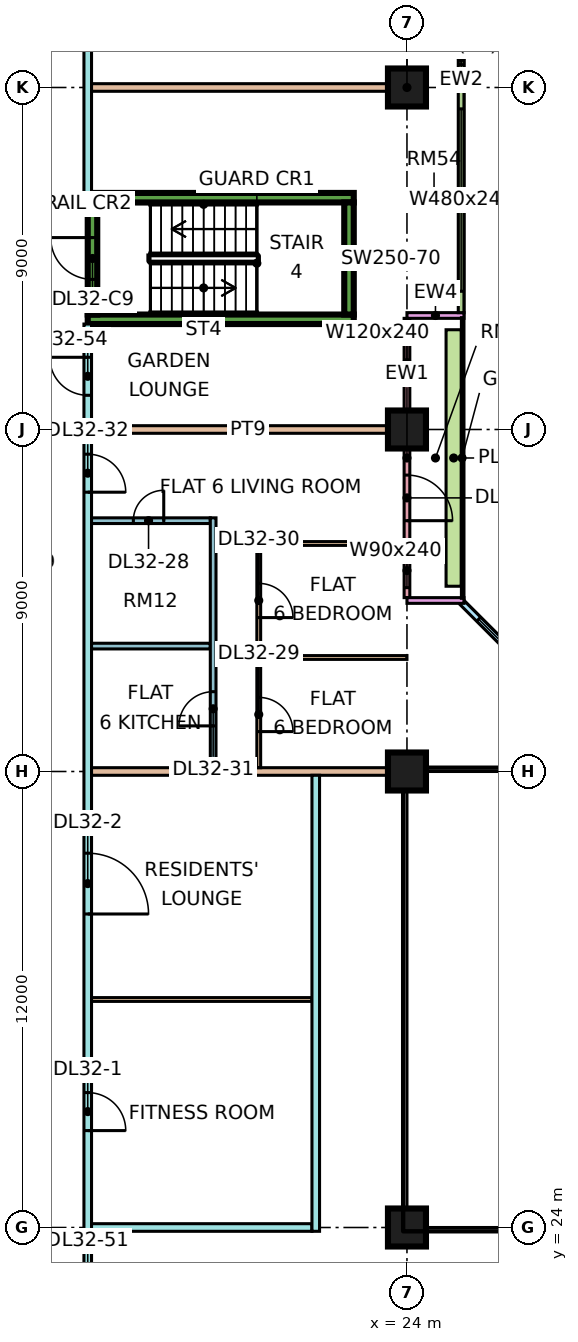
"""IFC4 building model, lengths in metres.
Left out: names, types, materials, properties, quantities, classifications, styles, units other than length and angle.
Written with IfcOpenShell. Run it as: python <this file> out.ifc"""

import sys

from ifc_helpers import new_model, si_unit, direction, frame, frame_2d, origin, origin_2d, place, context, subcontext, project, spatial, rectangle, extrude, element, fill, save


model = new_model("IFC4")
c1 = context("Model", 3, precision=1e-05, world=origin(), true_north=direction((0.0, 1.0)))
c2 = subcontext(c1, "Body", "Model", "MODEL_VIEW")
j1 = project(units=[si_unit("LENGTHUNIT", "METRE"), si_unit("PLANEANGLEUNIT", "RADIAN")], contexts=[c1])
p1 = place(None, origin())
s1 = spatial("IfcSite", under=j1, at=p1, CompositionType="ELEMENT")
p2 = place(p1, origin())
s2 = spatial("IfcBuilding", under=s1, at=p2, CompositionType="ELEMENT")
p3 = place(p2, frame((0.0, 0.0, 136.9)))
s3 = spatial("IfcBuildingStorey", under=s2, at=p3, CompositionType="ELEMENT", Elevation=136.9)
for number, where, z_axis, x_axis in (
    (1, (24.0, 24.0, 0.0), (0.0, 0.0, 1.0), (1.0, 0.0, 0.0)),
    (2, (24.0, 36.0, 0.0), (0.0, 0.0, 1.0), (1.0, 0.0, 0.0)),
    (3, (24.0, 45.0, 0.0), (0.0, 0.0, 1.0), (1.0, 0.0, 0.0)),
    (4, (24.0, 54.0, 0.0), (0.0, 0.0, 1.0), (1.0, 0.0, 0.0)),
):
    element("IfcColumn", number, at=place(p3, frame(where, z_axis=z_axis, x_axis=x_axis)), inside=s3, PredefinedType="COLUMN", context=c2, shape_type="SweptSolid", body=[
        extrude(rectangle(XDim=1.0, YDim=1.0, at=origin_2d()), origin(), (0.0, 0.0, 1.0), 3.75),
    ])
for number, where, z_axis, x_axis in (
    (5, (15.6, 47.9, 0.0), (0.0, 0.0, 1.0), (1.0, 0.0, 0.0)),
    (6, (15.6, 51.1, 0.0), (0.0, 0.0, 1.0), (1.0, 0.0, 0.0)),
):
    element("IfcWall", number, at=place(p3, frame(where, z_axis=z_axis, x_axis=x_axis)), inside=s3, PredefinedType="SHEAR", context=c2, shape_type="SweptSolid", body=[
        extrude(rectangle(XDim=7.0, YDim=0.25, at=frame_2d((3.5, 0.0))), origin(), (0.0, 0.0, 1.0), 3.75),
    ])
p4 = place(p3, frame((15.725, 48.025, 0.0), z_axis=(0.0, 0.0, 1.0), x_axis=(0.0, 1.0, 0.0)))
e7 = element("IfcWall", 7, at=p4, inside=s3, PredefinedType="SHEAR", context=c2, shape_type="SweptSolid", body=[
    extrude(rectangle(XDim=2.95, YDim=0.25, at=frame_2d((1.475, 0.0))), origin(), (0.0, 0.0, 1.0), 3.75),
])
p5 = place(p4, frame((0.925, 0.0, 0.0)))
e8 = element("IfcOpeningElement", 8, at=p5, cuts=e7, PredefinedType="OPENING", context=c2, shape_type="SweptSolid", body=[
    extrude(rectangle(XDim=1.1, YDim=2.2, at=frame_2d((0.55, 1.1))), frame((0.0, 0.135, 0.0), z_axis=(0.0, -1.0, 0.0), x_axis=(1.0, 0.0, 0.0)), (0.0, 0.0, 1.0), 0.27),
])
p6 = place(p3, frame((22.475, 48.025, 0.0), z_axis=(0.0, 0.0, 1.0), x_axis=(0.0, 1.0, 0.0)))
e9 = element("IfcWall", 9, at=p6, inside=s3, PredefinedType="SHEAR", context=c2, shape_type="SweptSolid", body=[
    extrude(rectangle(XDim=2.95, YDim=0.25, at=frame_2d((1.475, 0.0))), origin(), (0.0, 0.0, 1.0), 3.75),
])
p7 = place(p3, frame((28.447, 37.447, 0.0), z_axis=(0.0, 0.0, 1.0), x_axis=(-0.707106781187, 0.707106781187, 0.0)))
e10 = element("IfcWall", 10, at=p7, inside=s3, PredefinedType="SOLIDWALL", context=c2, shape_type="SweptSolid", body=[
    extrude(rectangle(XDim=4.243, YDim=0.15, at=frame_2d((2.121, 0.0))), origin(), (0.0, 0.0, 1.0), 3.3),
])
p8 = place(p7, frame((0.621, 0.0, 0.45)))
e11 = element("IfcOpeningElement", 11, at=p8, cuts=e10, PredefinedType="OPENING", context=c2, shape_type="SweptSolid", body=[
    extrude(rectangle(XDim=3.0, YDim=2.4, at=frame_2d((1.5, 1.2))), frame((0.0, 0.085, 0.0), z_axis=(0.0, -1.0, 0.0), x_axis=(1.0, 0.0, 0.0)), (0.0, 0.0, 1.0), 0.17),
])
p9 = place(p3, frame((24.0, 40.575, 0.0), z_axis=(0.0, 0.0, 1.0), x_axis=(0.0, 1.0, 0.0)))
e12 = element("IfcWall", 12, at=p9, inside=s3, PredefinedType="SOLIDWALL", context=c2, shape_type="SweptSolid", body=[
    extrude(rectangle(XDim=7.35, YDim=0.15, at=frame_2d((3.675, 0.0))), origin(), (0.0, 0.0, 1.0), 3.3),
])
p10 = place(p9, frame((0.262, 0.0, 0.45)))
e13 = element("IfcOpeningElement", 13, at=p10, cuts=e12, PredefinedType="OPENING", context=c2, shape_type="SweptSolid", body=[
    extrude(rectangle(XDim=0.9, YDim=2.4, at=frame_2d((0.45, 1.2))), frame((0.0, 0.085, 0.0), z_axis=(0.0, -1.0, 0.0), x_axis=(1.0, 0.0, 0.0)), (0.0, 0.0, 1.0), 0.17),
])
p11 = place(p9, frame((2.025, 0.0, 0.0)))
e14 = element("IfcOpeningElement", 14, at=p11, cuts=e12, PredefinedType="OPENING", context=c2, shape_type="SweptSolid", body=[
    extrude(rectangle(XDim=1.2, YDim=2.4, at=frame_2d((0.6, 1.2))), frame((0.0, 0.085, 0.0), z_axis=(0.0, -1.0, 0.0), x_axis=(1.0, 0.0, 0.0)), (0.0, 0.0, 1.0), 0.17),
])
p12 = place(p9, frame((5.587, 0.0, 0.45)))
e15 = element("IfcOpeningElement", 15, at=p12, cuts=e12, PredefinedType="OPENING", context=c2, shape_type="SweptSolid", body=[
    extrude(rectangle(XDim=1.2, YDim=2.4, at=frame_2d((0.6, 1.2))), frame((0.0, 0.085, 0.0), z_axis=(0.0, -1.0, 0.0), x_axis=(1.0, 0.0, 0.0)), (0.0, 0.0, 1.0), 0.17),
])
for number, where, z_axis, x_axis in (
    (16, (25.5, 40.5, 0.0), (0.0, 0.0, 1.0), (-1.0, 0.0, 0.0)),
    (17, (25.5, 48.0, 0.0), (0.0, 0.0, 1.0), (-1.0, 0.0, 0.0)),
):
    element("IfcWall", number, at=place(p3, frame(where, z_axis=z_axis, x_axis=x_axis)), inside=s3, PredefinedType="SOLIDWALL", context=c2, shape_type="SweptSolid", body=[
        extrude(rectangle(XDim=1.5, YDim=0.15, at=frame_2d((0.75, 0.0))), origin(), (0.0, 0.0, 1.0), 3.3),
    ])
p13 = place(p3, frame((25.425, 48.075, 0.0), z_axis=(0.0, 0.0, 1.0), x_axis=(0.0, 1.0, 0.0)))
e18 = element("IfcWall", 18, at=p13, inside=s3, PredefinedType="SOLIDWALL", context=c2, shape_type="SweptSolid", body=[
    extrude(rectangle(XDim=13.425, YDim=0.15, at=frame_2d((6.712, 0.0))), origin(), (0.0, 0.0, 1.0), 3.3),
])
p14 = place(p13, frame((0.562, 0.0, 0.45)))
e19 = element("IfcOpeningElement", 19, at=p14, cuts=e18, PredefinedType="OPENING", context=c2, shape_type="SweptSolid", body=[
    extrude(rectangle(XDim=4.8, YDim=2.4, at=frame_2d((2.4, 1.2))), frame((0.0, 0.085, 0.0), z_axis=(0.0, -1.0, 0.0), x_axis=(1.0, 0.0, 0.0)), (0.0, 0.0, 1.0), 0.17),
])
p15 = place(p13, frame((6.525, 0.0, 0.45)))
e20 = element("IfcOpeningElement", 20, at=p15, cuts=e18, PredefinedType="OPENING", context=c2, shape_type="SweptSolid", body=[
    extrude(rectangle(XDim=1.8, YDim=2.4, at=frame_2d((0.9, 1.2))), frame((0.0, 0.085, 0.0), z_axis=(0.0, -1.0, 0.0), x_axis=(1.0, 0.0, 0.0)), (0.0, 0.0, 1.0), 0.17),
])
p16 = place(p13, frame((9.525, 0.0, 0.45)))
e21 = element("IfcOpeningElement", 21, at=p16, cuts=e18, PredefinedType="OPENING", context=c2, shape_type="SweptSolid", body=[
    extrude(rectangle(XDim=1.8, YDim=2.4, at=frame_2d((0.9, 1.2))), frame((0.0, 0.085, 0.0), z_axis=(0.0, -1.0, 0.0), x_axis=(1.0, 0.0, 0.0)), (0.0, 0.0, 1.0), 0.17),
])
p17 = place(p13, frame((12.225, 0.0, 0.45)))
e22 = element("IfcOpeningElement", 22, at=p17, cuts=e18, PredefinedType="OPENING", context=c2, shape_type="SweptSolid", body=[
    extrude(rectangle(XDim=0.9, YDim=2.4, at=frame_2d((0.45, 1.2))), frame((0.0, 0.085, 0.0), z_axis=(0.0, -1.0, 0.0), x_axis=(1.0, 0.0, 0.0)), (0.0, 0.0, 1.0), 0.17),
])
p18 = place(p3, frame((25.229, 40.875, 0.0), z_axis=(0.0, 0.0, 1.0), x_axis=(0.0, 1.0, 0.0)))
e23 = element("IfcWall", 23, at=p18, inside=s3, PredefinedType="SOLIDWALL", context=c2, shape_type="SweptSolid", body=[
    extrude(rectangle(XDim=6.75, YDim=0.4, at=frame_2d((3.375, 0.0))), origin(), (0.0, 0.0, 1.0), 0.7),
])
p19 = place(p3, frame((15.6, 20.0, 0.0), z_axis=(0.0, 0.0, 1.0), x_axis=(0.0, 1.0, 0.0)))
e24 = element("IfcWall", 24, at=p19, inside=s3, PredefinedType="PARTITIONING", context=c2, shape_type="SweptSolid", body=[
    extrude(rectangle(XDim=27.775, YDim=0.2, at=frame_2d((13.887, 0.0))), origin(), (0.0, 0.0, 1.0), 3.3),
])
p20 = place(p19, frame((6.55, 0.0, 0.0)))
e25 = element("IfcOpeningElement", 25, at=p20, cuts=e24, PredefinedType="OPENING", context=c2, shape_type="SweptSolid", body=[
    extrude(rectangle(XDim=1.0, YDim=2.1, at=frame_2d((0.5, 1.05))), frame((0.0, 0.11, 0.0), z_axis=(0.0, -1.0, 0.0), x_axis=(1.0, 0.0, 0.0)), (0.0, 0.0, 1.0), 0.22),
])
p21 = place(p19, frame((12.25, 0.0, 0.0)))
e26 = element("IfcOpeningElement", 26, at=p21, cuts=e24, PredefinedType="OPENING", context=c2, shape_type="SweptSolid", body=[
    extrude(rectangle(XDim=1.6, YDim=2.1, at=frame_2d((0.8, 1.05))), frame((0.0, 0.11, 0.0), z_axis=(0.0, -1.0, 0.0), x_axis=(1.0, 0.0, 0.0)), (0.0, 0.0, 1.0), 0.22),
])
p22 = place(p19, frame((23.35, 0.0, 0.0)))
e27 = element("IfcOpeningElement", 27, at=p22, cuts=e24, PredefinedType="OPENING", context=c2, shape_type="SweptSolid", body=[
    extrude(rectangle(XDim=1.0, YDim=2.1, at=frame_2d((0.5, 1.05))), frame((0.0, 0.11, 0.0), z_axis=(0.0, -1.0, 0.0), x_axis=(1.0, 0.0, 0.0)), (0.0, 0.0, 1.0), 0.22),
])
p23 = place(p19, frame((1.15, 0.0, 0.0)))
e28 = element("IfcOpeningElement", 28, at=p23, cuts=e24, PredefinedType="OPENING", context=c2, shape_type="SweptSolid", body=[
    extrude(rectangle(XDim=1.8, YDim=2.1, at=frame_2d((0.9, 1.05))), frame((0.0, 0.11, 0.0), z_axis=(0.0, -1.0, 0.0), x_axis=(1.0, 0.0, 0.0)), (0.0, 0.0, 1.0), 0.22),
])
p24 = place(p19, frame((25.9, 0.0, 0.0)))
e29 = element("IfcOpeningElement", 29, at=p24, cuts=e24, PredefinedType="OPENING", context=c2, shape_type="SweptSolid", body=[
    extrude(rectangle(XDim=1.0, YDim=2.1, at=frame_2d((0.5, 1.05))), frame((0.0, 0.11, 0.0), z_axis=(0.0, -1.0, 0.0), x_axis=(1.0, 0.0, 0.0)), (0.0, 0.0, 1.0), 0.22),
])
p25 = place(p3, frame((15.6, 51.225, 0.0), z_axis=(0.0, 0.0, 1.0), x_axis=(0.0, 1.0, 0.0)))
e30 = element("IfcWall", 30, at=p25, inside=s3, PredefinedType="PARTITIONING", context=c2, shape_type="SweptSolid", body=[
    extrude(rectangle(XDim=11.701, YDim=0.2, at=frame_2d((5.851, 0.0))), origin(), (0.0, 0.0, 1.0), 3.3),
])
p26 = place(p25, frame((3.825, 0.0, 0.0)))
e31 = element("IfcOpeningElement", 31, at=p26, cuts=e30, PredefinedType="OPENING", context=c2, shape_type="SweptSolid", body=[
    extrude(rectangle(XDim=1.0, YDim=2.1, at=frame_2d((0.5, 1.05))), frame((0.0, 0.11, 0.0), z_axis=(0.0, -1.0, 0.0), x_axis=(1.0, 0.0, 0.0)), (0.0, 0.0, 1.0), 0.22),
])
p27 = place(p3, frame((15.7, 24.0, 0.0), z_axis=(0.0, 0.0, 1.0), x_axis=(1.0, 0.0, 0.0)))
e32 = element("IfcWall", 32, at=p27, inside=s3, PredefinedType="PARTITIONING", context=c2, shape_type="SweptSolid", body=[
    extrude(rectangle(XDim=5.8, YDim=0.2, at=frame_2d((2.9, 0.0))), origin(), (0.0, 0.0, 1.0), 3.3),
])
p28 = place(p3, frame((15.7, 30.0, 0.0), z_axis=(0.0, 0.0, 1.0), x_axis=(1.0, 0.0, 0.0)))
e33 = element("IfcWall", 33, at=p28, inside=s3, PredefinedType="PARTITIONING", context=c2, shape_type="SweptSolid", body=[
    extrude(rectangle(XDim=5.8, YDim=0.1, at=frame_2d((2.9, 0.0))), origin(), (0.0, 0.0, 1.0), 3.3),
])
p29 = place(p3, frame((15.7, 36.0, 0.0), z_axis=(0.0, 0.0, 1.0), x_axis=(1.0, 0.0, 0.0)))
e34 = element("IfcWall", 34, at=p29, inside=s3, PredefinedType="PARTITIONING", context=c2, shape_type="SweptSolid", body=[
    extrude(rectangle(XDim=8.3, YDim=0.2, at=frame_2d((4.15, 0.0))), origin(), (0.0, 0.0, 1.0), 3.3),
])
p30 = place(p3, frame((15.7, 39.3, 0.0), z_axis=(0.0, 0.0, 1.0), x_axis=(1.0, 0.0, 0.0)))
e35 = element("IfcWall", 35, at=p30, inside=s3, PredefinedType="PARTITIONING", context=c2, shape_type="SweptSolid", body=[
    extrude(rectangle(XDim=3.125, YDim=0.15, at=frame_2d((1.562, 0.0))), origin(), (0.0, 0.0, 1.0), 3.3),
])
p31 = place(p3, frame((15.7, 42.6, 0.0), z_axis=(0.0, 0.0, 1.0), x_axis=(1.0, 0.0, 0.0)))
e36 = element("IfcWall", 36, at=p31, inside=s3, PredefinedType="PARTITIONING", context=c2, shape_type="SweptSolid", body=[
    extrude(rectangle(XDim=3.125, YDim=0.15, at=frame_2d((1.562, 0.0))), origin(), (0.0, 0.0, 1.0), 3.3),
])
p32 = place(p31, frame((1.1, 0.0, 0.0)))
e37 = element("IfcOpeningElement", 37, at=p32, cuts=e36, PredefinedType="OPENING", context=c2, shape_type="SweptSolid", body=[
    extrude(rectangle(XDim=0.8, YDim=2.1, at=frame_2d((0.4, 1.05))), frame((0.0, 0.085, 0.0), z_axis=(0.0, -1.0, 0.0), x_axis=(1.0, 0.0, 0.0)), (0.0, 0.0, 1.0), 0.17),
])
p33 = place(p3, frame((15.7, 45.0, 0.0), z_axis=(0.0, 0.0, 1.0), x_axis=(1.0, 0.0, 0.0)))
e38 = element("IfcWall", 38, at=p33, inside=s3, PredefinedType="PARTITIONING", context=c2, shape_type="SweptSolid", body=[
    extrude(rectangle(XDim=8.226, YDim=0.2, at=frame_2d((4.113, 0.0))), origin(), (0.0, 0.0, 1.0), 3.3),
])
p34 = place(p3, frame((15.7, 54.0, 0.0), z_axis=(0.0, 0.0, 1.0), x_axis=(1.0, 0.0, 0.0)))
e39 = element("IfcWall", 39, at=p34, inside=s3, PredefinedType="PARTITIONING", context=c2, shape_type="SweptSolid", body=[
    extrude(rectangle(XDim=8.3, YDim=0.2, at=frame_2d((4.15, 0.0))), origin(), (0.0, 0.0, 1.0), 3.3),
])
p35 = place(p3, frame((18.9, 36.1, 0.0), z_axis=(0.0, 0.0, 1.0), x_axis=(0.0, 1.0, 0.0)))
e40 = element("IfcWall", 40, at=p35, inside=s3, PredefinedType="PARTITIONING", context=c2, shape_type="SweptSolid", body=[
    extrude(rectangle(XDim=6.575, YDim=0.15, at=frame_2d((3.288, 0.0))), origin(), (0.0, 0.0, 1.0), 3.3),
])
p36 = place(p35, frame((1.1, 0.0, 0.0)))
e41 = element("IfcOpeningElement", 41, at=p36, cuts=e40, PredefinedType="OPENING", context=c2, shape_type="SweptSolid", body=[
    extrude(rectangle(XDim=0.9, YDim=2.1, at=frame_2d((0.45, 1.05))), frame((0.0, 0.085, 0.0), z_axis=(0.0, -1.0, 0.0), x_axis=(1.0, 0.0, 0.0)), (0.0, 0.0, 1.0), 0.17),
])
p37 = place(p3, frame((20.1, 36.1, 0.0), z_axis=(0.0, 0.0, 1.0), x_axis=(0.0, 1.0, 0.0)))
e42 = element("IfcWall", 42, at=p37, inside=s3, PredefinedType="PARTITIONING", context=c2, shape_type="SweptSolid", body=[
    extrude(rectangle(XDim=5.95, YDim=0.1, at=frame_2d((2.975, 0.0))), origin(), (0.0, 0.0, 1.0), 3.3),
])
p38 = place(p37, frame((0.95, 0.0, 0.0)))
e43 = element("IfcOpeningElement", 43, at=p38, cuts=e42, PredefinedType="OPENING", context=c2, shape_type="SweptSolid", body=[
    extrude(rectangle(XDim=0.9, YDim=2.1, at=frame_2d((0.45, 1.05))), frame((0.0, 0.06, 0.0), z_axis=(0.0, -1.0, 0.0), x_axis=(1.0, 0.0, 0.0)), (0.0, 0.0, 1.0), 0.12),
])
p39 = place(p37, frame((3.95, 0.0, 0.0)))
e44 = element("IfcOpeningElement", 44, at=p39, cuts=e42, PredefinedType="OPENING", context=c2, shape_type="SweptSolid", body=[
    extrude(rectangle(XDim=0.9, YDim=2.1, at=frame_2d((0.45, 1.05))), frame((0.0, 0.06, 0.0), z_axis=(0.0, -1.0, 0.0), x_axis=(1.0, 0.0, 0.0)), (0.0, 0.0, 1.0), 0.12),
])
p40 = place(p3, frame((20.15, 39.0, 0.0), z_axis=(0.0, 0.0, 1.0), x_axis=(1.0, 0.0, 0.0)))
e45 = element("IfcWall", 45, at=p40, inside=s3, PredefinedType="PARTITIONING", context=c2, shape_type="SweptSolid", body=[
    extrude(rectangle(XDim=3.85, YDim=0.1, at=frame_2d((1.925, 0.0))), origin(), (0.0, 0.0, 1.0), 3.3),
])
p41 = place(p3, frame((20.15, 42.0, 0.0), z_axis=(0.0, 0.0, 1.0), x_axis=(1.0, 0.0, 0.0)))
e46 = element("IfcWall", 46, at=p41, inside=s3, PredefinedType="PARTITIONING", context=c2, shape_type="SweptSolid", body=[
    extrude(rectangle(XDim=3.776, YDim=0.1, at=frame_2d((1.888, 0.0))), origin(), (0.0, 0.0, 1.0), 3.3),
])
p42 = place(p3, frame((21.6, 23.9, 0.0), z_axis=(0.0, 0.0, 1.0), x_axis=(0.0, 1.0, 0.0)))
e47 = element("IfcWall", 47, at=p42, inside=s3, PredefinedType="PARTITIONING", context=c2, shape_type="SweptSolid", body=[
    extrude(rectangle(XDim=12.0, YDim=0.2, at=frame_2d((6.0, 0.0))), origin(), (0.0, 0.0, 1.0), 3.3),
])
p43 = place(p8, origin())
e48 = element("IfcWindow", 48, at=p43, inside=s3, PartitioningType="SINGLE_PANEL", PredefinedType="WINDOW", context=c2, shape_type="SweptSolid", body=[
    extrude(rectangle(XDim=3.0, YDim=2.4, at=frame_2d((1.5, 1.2))), frame((0.0, 0.03, 0.0), z_axis=(0.0, -1.0, 0.0), x_axis=(1.0, 0.0, 0.0)), (0.0, 0.0, 1.0), 0.06),
])
fill(e11, e48)
p44 = place(p10, origin())
e49 = element("IfcWindow", 49, at=p44, inside=s3, PartitioningType="SINGLE_PANEL", PredefinedType="WINDOW", context=c2, shape_type="SweptSolid", body=[
    extrude(rectangle(XDim=0.9, YDim=2.4, at=frame_2d((0.45, 1.2))), frame((0.0, 0.03, 0.0), z_axis=(0.0, -1.0, 0.0), x_axis=(1.0, 0.0, 0.0)), (0.0, 0.0, 1.0), 0.06),
])
fill(e13, e49)
p45 = place(p11, frame((1.2, 0.0, 0.0), z_axis=(0.0, 0.0, 1.0), x_axis=(-1.0, 0.0, 0.0)))
e50 = element("IfcDoor", 50, at=p45, inside=s3, OperationType="DOUBLE_DOOR_SINGLE_SWING", PredefinedType="DOOR", context=c2, shape_type="SweptSolid", body=[
    extrude(rectangle(XDim=1.2, YDim=2.4, at=frame_2d((0.6, 1.2))), frame((0.0, 0.025, 0.0), z_axis=(0.0, -1.0, 0.0), x_axis=(1.0, 0.0, 0.0)), (0.0, 0.0, 1.0), 0.05),
])
fill(e14, e50)
p46 = place(p12, origin())
e51 = element("IfcWindow", 51, at=p46, inside=s3, PartitioningType="SINGLE_PANEL", PredefinedType="WINDOW", context=c2, shape_type="SweptSolid", body=[
    extrude(rectangle(XDim=1.2, YDim=2.4, at=frame_2d((0.6, 1.2))), frame((0.0, 0.03, 0.0), z_axis=(0.0, -1.0, 0.0), x_axis=(1.0, 0.0, 0.0)), (0.0, 0.0, 1.0), 0.06),
])
fill(e15, e51)
p47 = place(p14, origin())
e52 = element("IfcWindow", 52, at=p47, inside=s3, PartitioningType="SINGLE_PANEL", PredefinedType="WINDOW", context=c2, shape_type="SweptSolid", body=[
    extrude(rectangle(XDim=4.8, YDim=2.4, at=frame_2d((2.4, 1.2))), frame((0.0, 0.03, 0.0), z_axis=(0.0, -1.0, 0.0), x_axis=(1.0, 0.0, 0.0)), (0.0, 0.0, 1.0), 0.06),
])
fill(e19, e52)
p48 = place(p15, origin())
e53 = element("IfcWindow", 53, at=p48, inside=s3, PartitioningType="SINGLE_PANEL", PredefinedType="WINDOW", context=c2, shape_type="SweptSolid", body=[
    extrude(rectangle(XDim=1.8, YDim=2.4, at=frame_2d((0.9, 1.2))), frame((0.0, 0.03, 0.0), z_axis=(0.0, -1.0, 0.0), x_axis=(1.0, 0.0, 0.0)), (0.0, 0.0, 1.0), 0.06),
])
fill(e20, e53)
p49 = place(p5, frame((1.1, 0.0, 0.0), z_axis=(0.0, 0.0, 1.0), x_axis=(-1.0, 0.0, 0.0)))
e54 = element("IfcDoor", 54, at=p49, inside=s3, OperationType="SINGLE_SWING_RIGHT", PredefinedType="DOOR", context=c2, shape_type="SweptSolid", body=[
    extrude(rectangle(XDim=1.1, YDim=2.2, at=frame_2d((0.55, 1.1))), frame((0.0, 0.025, 0.0), z_axis=(0.0, -1.0, 0.0), x_axis=(1.0, 0.0, 0.0)), (0.0, 0.0, 1.0), 0.05),
])
fill(e8, e54)
p50 = place(p20, frame((1.0, 0.0, 0.0), z_axis=(0.0, 0.0, 1.0), x_axis=(-1.0, 0.0, 0.0)))
e55 = element("IfcDoor", 55, at=p50, inside=s3, OperationType="SINGLE_SWING_LEFT", PredefinedType="DOOR", context=c2, shape_type="SweptSolid", body=[
    extrude(rectangle(XDim=1.0, YDim=2.1, at=frame_2d((0.5, 1.05))), frame((0.0, 0.025, 0.0), z_axis=(0.0, -1.0, 0.0), x_axis=(1.0, 0.0, 0.0)), (0.0, 0.0, 1.0), 0.05),
])
fill(e25, e55)
p51 = place(p21, frame((1.6, 0.0, 0.0), z_axis=(0.0, 0.0, 1.0), x_axis=(-1.0, 0.0, 0.0)))
e56 = element("IfcDoor", 56, at=p51, inside=s3, OperationType="DOUBLE_DOOR_SINGLE_SWING", PredefinedType="DOOR", context=c2, shape_type="SweptSolid", body=[
    extrude(rectangle(XDim=1.6, YDim=2.1, at=frame_2d((0.8, 1.05))), frame((0.0, 0.025, 0.0), z_axis=(0.0, -1.0, 0.0), x_axis=(1.0, 0.0, 0.0)), (0.0, 0.0, 1.0), 0.05),
])
fill(e26, e56)
p52 = place(p32, frame((0.8, 0.0, 0.0), z_axis=(0.0, 0.0, 1.0), x_axis=(-1.0, 0.0, 0.0)))
e57 = element("IfcDoor", 57, at=p52, inside=s3, OperationType="SINGLE_SWING_RIGHT", PredefinedType="DOOR", context=c2, shape_type="SweptSolid", body=[
    extrude(rectangle(XDim=0.8, YDim=2.1, at=frame_2d((0.4, 1.05))), frame((0.0, 0.025, 0.0), z_axis=(0.0, -1.0, 0.0), x_axis=(1.0, 0.0, 0.0)), (0.0, 0.0, 1.0), 0.05),
])
fill(e37, e57)
p53 = place(p38, frame((0.9, 0.0, 0.0), z_axis=(0.0, 0.0, 1.0), x_axis=(-1.0, 0.0, 0.0)))
e58 = element("IfcDoor", 58, at=p53, inside=s3, OperationType="SINGLE_SWING_LEFT", PredefinedType="DOOR", context=c2, shape_type="SweptSolid", body=[
    extrude(rectangle(XDim=0.9, YDim=2.1, at=frame_2d((0.45, 1.05))), frame((0.0, 0.025, 0.0), z_axis=(0.0, -1.0, 0.0), x_axis=(1.0, 0.0, 0.0)), (0.0, 0.0, 1.0), 0.05),
])
fill(e43, e58)
p54 = place(p39, frame((0.9, 0.0, 0.0), z_axis=(0.0, 0.0, 1.0), x_axis=(-1.0, 0.0, 0.0)))
e59 = element("IfcDoor", 59, at=p54, inside=s3, OperationType="SINGLE_SWING_LEFT", PredefinedType="DOOR", context=c2, shape_type="SweptSolid", body=[
    extrude(rectangle(XDim=0.9, YDim=2.1, at=frame_2d((0.45, 1.05))), frame((0.0, 0.025, 0.0), z_axis=(0.0, -1.0, 0.0), x_axis=(1.0, 0.0, 0.0)), (0.0, 0.0, 1.0), 0.05),
])
fill(e44, e59)
p55 = place(p36, origin())
e60 = element("IfcDoor", 60, at=p55, inside=s3, OperationType="SINGLE_SWING_LEFT", PredefinedType="DOOR", context=c2, shape_type="SweptSolid", body=[
    extrude(rectangle(XDim=0.9, YDim=2.1, at=frame_2d((0.45, 1.05))), frame((0.0, 0.025, 0.0), z_axis=(0.0, -1.0, 0.0), x_axis=(1.0, 0.0, 0.0)), (0.0, 0.0, 1.0), 0.05),
])
fill(e41, e60)
p56 = place(p22, frame((1.0, 0.0, 0.0), z_axis=(0.0, 0.0, 1.0), x_axis=(-1.0, 0.0, 0.0)))
e61 = element("IfcDoor", 61, at=p56, inside=s3, OperationType="SINGLE_SWING_LEFT", PredefinedType="DOOR", context=c2, shape_type="SweptSolid", body=[
    extrude(rectangle(XDim=1.0, YDim=2.1, at=frame_2d((0.5, 1.05))), frame((0.0, 0.025, 0.0), z_axis=(0.0, -1.0, 0.0), x_axis=(1.0, 0.0, 0.0)), (0.0, 0.0, 1.0), 0.05),
])
fill(e27, e61)
p57 = place(p24, frame((1.0, 0.0, 0.0), z_axis=(0.0, 0.0, 1.0), x_axis=(-1.0, 0.0, 0.0)))
e62 = element("IfcDoor", 62, at=p57, inside=s3, OperationType="SINGLE_SWING_RIGHT", PredefinedType="DOOR", context=c2, shape_type="SweptSolid", body=[
    extrude(rectangle(XDim=1.0, YDim=2.1, at=frame_2d((0.5, 1.05))), frame((0.0, 0.025, 0.0), z_axis=(0.0, -1.0, 0.0), x_axis=(1.0, 0.0, 0.0)), (0.0, 0.0, 1.0), 0.05),
])
fill(e29, e62)
save(model, sys.argv[1])
